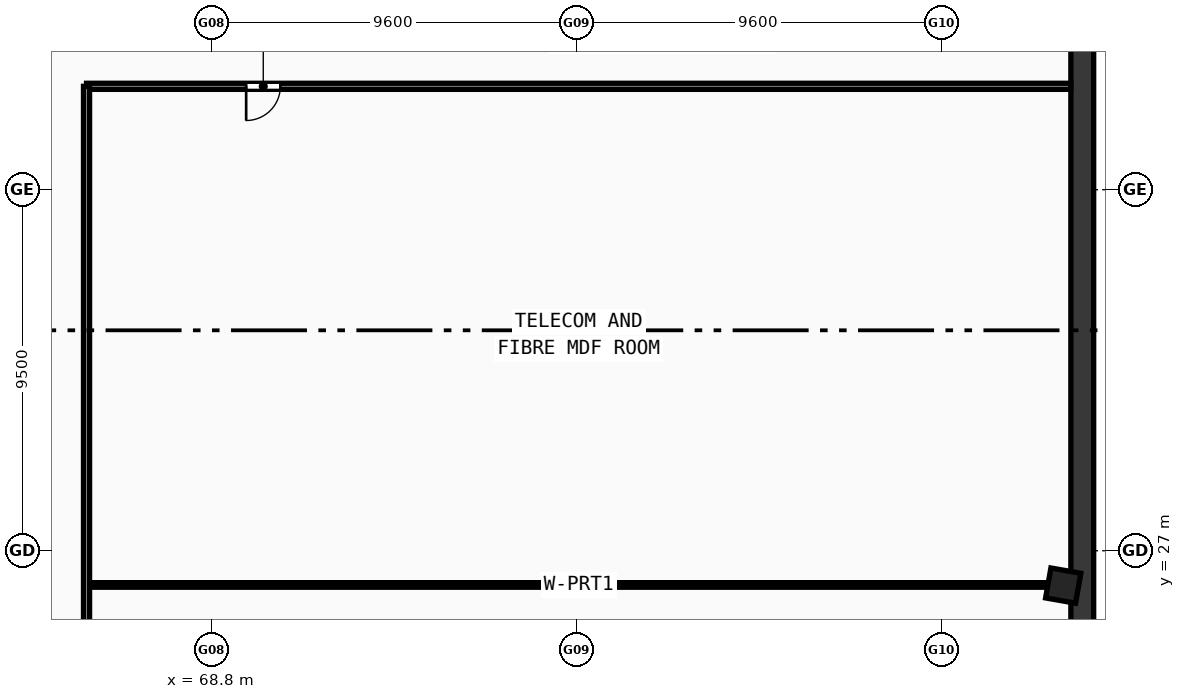
"""IFC4 building model, lengths in metres.
Left out: names, types, materials, properties, quantities, classifications, styles, units other than length and angle.
Written with IfcOpenShell. Run it as: python <this file> out.ifc"""

import sys

from ifc_helpers import new_model, si_unit, direction, frame, frame_2d, origin, origin_2d, place, context, subcontext, project, spatial, rectangle, hollow_rectangle, extrude, source, transform, mapped, element, fill, save


model = new_model("IFC4")
c1 = context("Model", 3, precision=1e-05, world=origin(), true_north=direction((0.0, 1.0)))
c2 = subcontext(c1, "Body", "Model", "MODEL_VIEW")
j1 = project(units=[si_unit("LENGTHUNIT", "METRE"), si_unit("PLANEANGLEUNIT", "RADIAN")], contexts=[c1])
p1 = place(None, origin())
s1 = spatial("IfcSite", under=j1, at=p1, CompositionType="ELEMENT")
p2 = place(p1, origin())
s2 = spatial("IfcBuilding", under=s1, at=p2, CompositionType="ELEMENT")
p3 = place(p2, frame((0.0, 0.0, -4.8)))
s3 = spatial("IfcBuildingStorey", under=s2, at=p3, CompositionType="ELEMENT", Elevation=-4.8)
p4 = place(p3, frame((91.7, 6.6, 0.0), z_axis=(0.0, 0.0, 1.0), x_axis=(0.0, 1.0, 0.0)))
e1 = element("IfcWall", 1, at=p4, inside=s3, PredefinedType="SHEAR", context=c2, shape_type="SweptSolid", body=[
    extrude(rectangle(XDim=82.8, YDim=0.6, at=frame_2d((41.4, 0.0))), origin(), (0.0, 0.0, 1.0), 4.52),
])
m1 = source(origin(), c2, "Body", "SweptSolid", [
    extrude(hollow_rectangle(XDim=0.8, YDim=0.8, WallThickness=0.032, at=origin_2d()), origin(), (0.0, 0.0, 1.0), 4.82),
])
p5 = place(p3, frame((91.199, 26.083, -0.3), z_axis=(0.0, 0.0, 1.0), x_axis=(0.173648177667, 0.984807753012, 0.0)))
e2 = element("IfcColumn", 2, at=p5, inside=s3, PredefinedType="COLUMN", context=c2, shape_type="MappedRepresentation", body=[
    mapped(m1, transform((0.0, 0.0, 0.0), scale=1.0)),
])
p6 = place(p3, frame((65.5, 39.22, 0.0), z_axis=(0.0, 0.0, 1.0), x_axis=(1.0, 0.0, 0.0)))
e3 = element("IfcWall", 3, at=p6, inside=s3, PredefinedType="PARTITIONING", context=c2, shape_type="SweptSolid", body=[
    extrude(rectangle(XDim=25.9, YDim=0.16, at=frame_2d((12.95, 0.0))), origin(), (0.0, 0.0, 1.0), 3.62),
])
p7 = place(p6, frame((4.2, 0.0, 0.0)))
e4 = element("IfcOpeningElement", 4, at=p7, cuts=e3, PredefinedType="OPENING", context=c2, shape_type="SweptSolid", body=[
    extrude(rectangle(XDim=0.9, YDim=2.1, at=frame_2d((0.45, 1.05))), frame((0.0, 0.09, 0.0), z_axis=(0.0, -1.0, 0.0), x_axis=(1.0, 0.0, 0.0)), (0.0, 0.0, 1.0), 0.18),
])
p8 = place(p3, frame((65.5, 26.1, 0.0), z_axis=(0.0, 0.0, 1.0), x_axis=(1.0, 0.0, 0.0)))
e5 = element("IfcWall", 5, at=p8, inside=s3, PredefinedType="PARTITIONING", context=c2, shape_type="SweptSolid", body=[
    extrude(rectangle(XDim=25.9, YDim=0.12, at=frame_2d((12.95, 0.0))), origin(), (0.0, 0.0, 1.0), 3.62),
])
p9 = place(p3, frame((65.5, 12.45, 0.0), z_axis=(0.0, 0.0, 1.0), x_axis=(0.0, 1.0, 0.0)))
e6 = element("IfcWall", 6, at=p9, inside=s3, PredefinedType="PARTITIONING", context=c2, shape_type="SweptSolid", body=[
    extrude(rectangle(XDim=26.77, YDim=0.16, at=frame_2d((13.385, 0.0))), origin(), (0.0, 0.0, 1.0), 3.62),
])
m2 = source(origin(), c2, "Body", "SweptSolid", [
    extrude(rectangle(XDim=0.9, YDim=2.1, at=frame_2d((0.45, 1.05))), frame((0.0, 0.025, 0.0), z_axis=(0.0, -1.0, 0.0), x_axis=(1.0, 0.0, 0.0)), (0.0, 0.0, 1.0), 0.05),
])
p10 = place(p7, frame((0.9, 0.0, 0.0), z_axis=(0.0, 0.0, 1.0), x_axis=(-1.0, 0.0, 0.0)))
e7 = element("IfcDoor", 7, at=p10, inside=s3, OperationType="SINGLE_SWING_RIGHT", PredefinedType="DOOR", context=c2, shape_type="MappedRepresentation", body=[
    mapped(m2, transform((0.0, 0.0, 0.0), scale=1.0)),
])
fill(e4, e7)
save(model, sys.argv[1])
